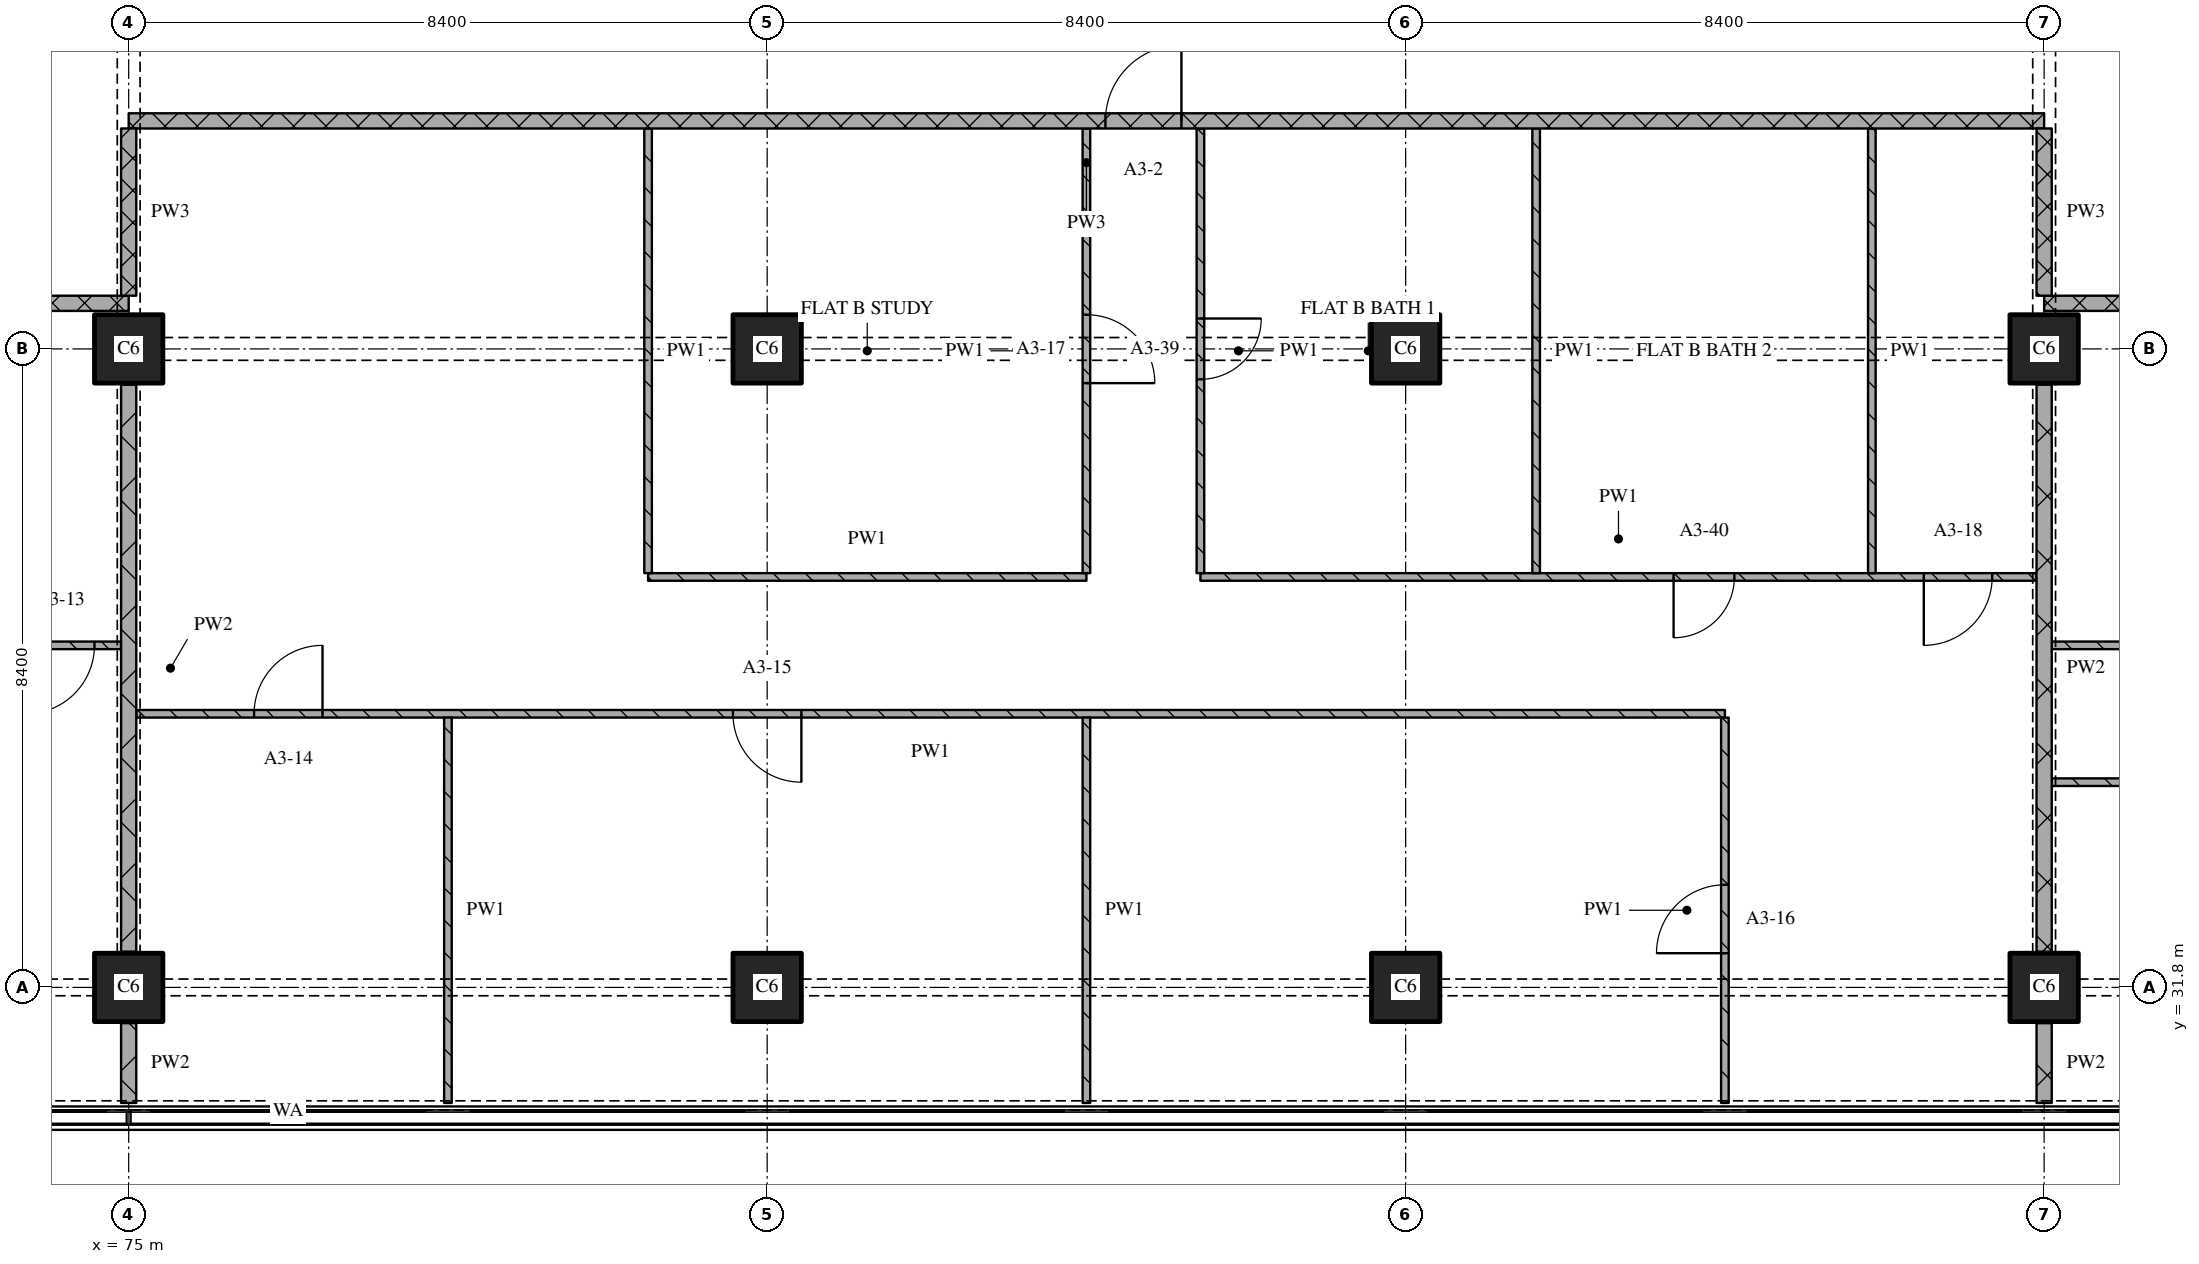
"""IFC4 building model, lengths in metres.
Left out: names, types, materials, properties, quantities, classifications, styles, units other than length and angle.
Written with IfcOpenShell. Run it as: python <this file> out.ifc"""

import sys

from ifc_helpers import new_model, si_unit, direction, frame, frame_2d, origin, origin_2d, place, context, subcontext, project, spatial, rectangle, extrude, element, fill, save


model = new_model("IFC4")
c1 = context("Model", 3, precision=1e-05, world=origin(), true_north=direction((0.0, 1.0)))
c2 = subcontext(c1, "Body", "Model", "MODEL_VIEW")
j1 = project(units=[si_unit("LENGTHUNIT", "METRE"), si_unit("PLANEANGLEUNIT", "RADIAN")], contexts=[c1])
p1 = place(None, origin())
s1 = spatial("IfcSite", under=j1, at=p1, CompositionType="ELEMENT")
p2 = place(p1, origin())
s2 = spatial("IfcBuilding", under=s1, at=p2, CompositionType="ELEMENT")
p3 = place(p2, frame((0.0, 0.0, 62.4)))
s3 = spatial("IfcBuildingStorey", under=s2, at=p3, CompositionType="ELEMENT", Elevation=62.4)
for number, where, z_axis, x_axis in (
    (1, (75.0, 31.8, 0.0), (0.0, 0.0, 1.0), (1.0, 0.0, 0.0)),
    (2, (75.0, 40.2, 0.0), (0.0, 0.0, 1.0), (1.0, 0.0, 0.0)),
    (3, (83.4, 31.8, 0.0), (0.0, 0.0, 1.0), (1.0, 0.0, 0.0)),
    (4, (83.4, 40.2, 0.0), (0.0, 0.0, 1.0), (1.0, 0.0, 0.0)),
    (5, (91.8, 31.8, 0.0), (0.0, 0.0, 1.0), (1.0, 0.0, 0.0)),
    (6, (91.8, 40.2, 0.0), (0.0, 0.0, 1.0), (1.0, 0.0, 0.0)),
    (7, (100.2, 31.8, 0.0), (0.0, 0.0, 1.0), (1.0, 0.0, 0.0)),
    (8, (100.2, 40.2, 0.0), (0.0, 0.0, 1.0), (1.0, 0.0, 0.0)),
):
    element("IfcColumn", number, at=place(p3, frame(where, z_axis=z_axis, x_axis=x_axis)), inside=s3, PredefinedType="COLUMN", context=c2, shape_type="SweptSolid", body=[
        extrude(rectangle(XDim=0.9, YDim=0.9, at=origin_2d()), origin(), (0.0, 0.0, 1.0), 3.6),
    ])
p4 = place(p3, frame((100.3, 34.5, 0.0), z_axis=(0.0, 0.0, 1.0), x_axis=(1.0, 0.0, 0.0)))
e9 = element("IfcWall", 9, at=p4, inside=s3, PredefinedType="PARTITIONING", context=c2, shape_type="SweptSolid", body=[
    extrude(rectangle(XDim=8.3, YDim=0.1, at=frame_2d((4.15, 0.0))), origin(), (0.0, 0.0, 1.0), 3.32),
])
p5 = place(p3, frame((96.0, 35.4, 0.0), z_axis=(0.0, 0.0, 1.0), x_axis=(-1.0, 0.0, 0.0)))
e10 = element("IfcWall", 10, at=p5, inside=s3, PredefinedType="PARTITIONING", context=c2, shape_type="SweptSolid", body=[
    extrude(rectangle(XDim=20.9, YDim=0.1, at=frame_2d((10.45, 0.0))), origin(), (0.0, 0.0, 1.0), 3.32),
])
p6 = place(p5, frame((12.15, 0.0, 0.0)))
e11 = element("IfcOpeningElement", 11, at=p6, cuts=e10, PredefinedType="OPENING", context=c2, shape_type="SweptSolid", body=[
    extrude(rectangle(XDim=0.9, YDim=2.1, at=frame_2d((0.45, 1.05))), frame((0.0, 0.06, 0.0), z_axis=(0.0, -1.0, 0.0), x_axis=(1.0, 0.0, 0.0)), (0.0, 0.0, 1.0), 0.12),
])
p7 = place(p5, frame((18.45, 0.0, 0.0)))
e12 = element("IfcOpeningElement", 12, at=p7, cuts=e10, PredefinedType="OPENING", context=c2, shape_type="SweptSolid", body=[
    extrude(rectangle(XDim=0.9, YDim=2.1, at=frame_2d((0.45, 1.05))), frame((0.0, 0.06, 0.0), z_axis=(0.0, -1.0, 0.0), x_axis=(1.0, 0.0, 0.0)), (0.0, 0.0, 1.0), 0.12),
])
p8 = place(p3, frame((64.2, 36.3, 0.0), z_axis=(0.0, 0.0, 1.0), x_axis=(1.0, 0.0, 0.0)))
e13 = element("IfcWall", 13, at=p8, inside=s3, PredefinedType="PARTITIONING", context=c2, shape_type="SweptSolid", body=[
    extrude(rectangle(XDim=10.7, YDim=0.1, at=frame_2d((5.35, 0.0))), origin(), (0.0, 0.0, 1.0), 3.32),
])
p9 = place(p8, frame((6.35, 0.0, 0.0)))
e14 = element("IfcOpeningElement", 14, at=p9, cuts=e13, PredefinedType="OPENING", context=c2, shape_type="SweptSolid", body=[
    extrude(rectangle(XDim=0.8, YDim=2.1, at=frame_2d((0.4, 1.05))), frame((0.0, 0.06, 0.0), z_axis=(0.0, -1.0, 0.0), x_axis=(1.0, 0.0, 0.0)), (0.0, 0.0, 1.0), 0.12),
])
p10 = place(p8, frame((9.45, 0.0, 0.0)))
e15 = element("IfcOpeningElement", 15, at=p10, cuts=e13, PredefinedType="OPENING", context=c2, shape_type="SweptSolid", body=[
    extrude(rectangle(XDim=0.9, YDim=2.1, at=frame_2d((0.45, 1.05))), frame((0.0, 0.06, 0.0), z_axis=(0.0, -1.0, 0.0), x_axis=(1.0, 0.0, 0.0)), (0.0, 0.0, 1.0), 0.12),
])
p11 = place(p3, frame((100.3, 36.3, 0.0), z_axis=(0.0, 0.0, 1.0), x_axis=(1.0, 0.0, 0.0)))
e16 = element("IfcWall", 16, at=p11, inside=s3, PredefinedType="PARTITIONING", context=c2, shape_type="SweptSolid", body=[
    extrude(rectangle(XDim=10.7, YDim=0.1, at=frame_2d((5.35, 0.0))), origin(), (0.0, 0.0, 1.0), 3.32),
])
p12 = place(p11, frame((1.75, 0.0, 0.0)))
e17 = element("IfcOpeningElement", 17, at=p12, cuts=e16, PredefinedType="OPENING", context=c2, shape_type="SweptSolid", body=[
    extrude(rectangle(XDim=0.8, YDim=2.1, at=frame_2d((0.4, 1.05))), frame((0.0, 0.06, 0.0), z_axis=(0.0, -1.0, 0.0), x_axis=(1.0, 0.0, 0.0)), (0.0, 0.0, 1.0), 0.12),
])
p13 = place(p11, frame((6.25, 0.0, 0.0)))
e18 = element("IfcOpeningElement", 18, at=p13, cuts=e16, PredefinedType="OPENING", context=c2, shape_type="SweptSolid", body=[
    extrude(rectangle(XDim=0.8, YDim=2.1, at=frame_2d((0.4, 1.05))), frame((0.0, 0.06, 0.0), z_axis=(0.0, -1.0, 0.0), x_axis=(1.0, 0.0, 0.0)), (0.0, 0.0, 1.0), 0.12),
])
p14 = place(p3, frame((81.833, 37.2, 0.0), z_axis=(0.0, 0.0, 1.0), x_axis=(1.0, 0.0, 0.0)))
e19 = element("IfcWall", 19, at=p14, inside=s3, PredefinedType="PARTITIONING", context=c2, shape_type="SweptSolid", body=[
    extrude(rectangle(XDim=5.767, YDim=0.1, at=frame_2d((2.883, 0.0))), origin(), (0.0, 0.0, 1.0), 3.32),
])
p15 = place(p3, frame((89.1, 37.2, 0.0), z_axis=(0.0, 0.0, 1.0), x_axis=(1.0, 0.0, 0.0)))
e20 = element("IfcWall", 20, at=p15, inside=s3, PredefinedType="PARTITIONING", context=c2, shape_type="SweptSolid", body=[
    extrude(rectangle(XDim=11.0, YDim=0.1, at=frame_2d((5.5, 0.0))), origin(), (0.0, 0.0, 1.0), 3.32),
])
p16 = place(p15, frame((6.225, 0.0, 0.0)))
e21 = element("IfcOpeningElement", 21, at=p16, cuts=e20, PredefinedType="OPENING", context=c2, shape_type="SweptSolid", body=[
    extrude(rectangle(XDim=0.8, YDim=2.1, at=frame_2d((0.4, 1.05))), frame((0.0, 0.06, 0.0), z_axis=(0.0, -1.0, 0.0), x_axis=(1.0, 0.0, 0.0)), (0.0, 0.0, 1.0), 0.12),
])
p17 = place(p15, frame((9.517, 0.0, 0.0)))
e22 = element("IfcOpeningElement", 22, at=p17, cuts=e20, PredefinedType="OPENING", context=c2, shape_type="SweptSolid", body=[
    extrude(rectangle(XDim=0.9, YDim=2.1, at=frame_2d((0.45, 1.05))), frame((0.0, 0.06, 0.0), z_axis=(0.0, -1.0, 0.0), x_axis=(1.0, 0.0, 0.0)), (0.0, 0.0, 1.0), 0.12),
])
p18 = place(p3, frame((75.0, 40.8, 0.0), z_axis=(0.0, 0.0, 1.0), x_axis=(-1.0, 0.0, 0.0)))
e23 = element("IfcWall", 23, at=p18, inside=s3, PredefinedType="PARTITIONING", context=c2, shape_type="SweptSolid", body=[
    extrude(rectangle(XDim=24.08, YDim=0.2, at=frame_2d((12.04, 0.0))), origin(), (0.0, 0.0, 1.0), 3.32),
])
p19 = place(p18, frame((11.05, 0.0, 0.0)))
e24 = element("IfcOpeningElement", 24, at=p19, cuts=e23, PredefinedType="OPENING", context=c2, shape_type="SweptSolid", body=[
    extrude(rectangle(XDim=1.0, YDim=2.1, at=frame_2d((0.5, 1.05))), frame((0.0, 0.11, 0.0), z_axis=(0.0, -1.0, 0.0), x_axis=(1.0, 0.0, 0.0)), (0.0, 0.0, 1.0), 0.22),
])
p20 = place(p3, frame((124.28, 40.8, 0.0), z_axis=(0.0, 0.0, 1.0), x_axis=(-1.0, 0.0, 0.0)))
e25 = element("IfcWall", 25, at=p20, inside=s3, PredefinedType="PARTITIONING", context=c2, shape_type="SweptSolid", body=[
    extrude(rectangle(XDim=24.08, YDim=0.2, at=frame_2d((12.04, 0.0))), origin(), (0.0, 0.0, 1.0), 3.32),
])
p21 = place(p20, frame((12.03, 0.0, 0.0)))
e26 = element("IfcOpeningElement", 26, at=p21, cuts=e25, PredefinedType="OPENING", context=c2, shape_type="SweptSolid", body=[
    extrude(rectangle(XDim=1.0, YDim=2.1, at=frame_2d((0.5, 1.05))), frame((0.0, 0.11, 0.0), z_axis=(0.0, -1.0, 0.0), x_axis=(1.0, 0.0, 0.0)), (0.0, 0.0, 1.0), 0.22),
])
p22 = place(p3, frame((100.2, 43.2, 0.0), z_axis=(0.0, 0.0, 1.0), x_axis=(-1.0, 0.0, 0.0)))
e27 = element("IfcWall", 27, at=p22, inside=s3, PredefinedType="PARTITIONING", context=c2, shape_type="SweptSolid", body=[
    extrude(rectangle(XDim=25.2, YDim=0.2, at=frame_2d((12.6, 0.0))), origin(), (0.0, 0.0, 1.0), 3.32),
])
p23 = place(p22, frame((11.35, 0.0, 0.0)))
e28 = element("IfcOpeningElement", 28, at=p23, cuts=e27, PredefinedType="OPENING", context=c2, shape_type="SweptSolid", body=[
    extrude(rectangle(XDim=1.0, YDim=2.1, at=frame_2d((0.5, 1.05))), frame((0.0, 0.11, 0.0), z_axis=(0.0, -1.0, 0.0), x_axis=(1.0, 0.0, 0.0)), (0.0, 0.0, 1.0), 0.22),
])
p24 = place(p3, frame((75.0, 43.1, 0.0), z_axis=(0.0, 0.0, 1.0), x_axis=(0.0, -1.0, 0.0)))
e29 = element("IfcWall", 29, at=p24, inside=s3, PredefinedType="PARTITIONING", context=c2, shape_type="SweptSolid", body=[
    extrude(rectangle(XDim=2.2, YDim=0.2, at=frame_2d((1.1, 0.0))), origin(), (0.0, 0.0, 1.0), 2.43),
])
p25 = place(p3, frame((75.0, 31.33, 0.0), z_axis=(0.0, 0.0, 1.0), x_axis=(0.0, -1.0, 0.0)))
e30 = element("IfcWall", 30, at=p25, inside=s3, PredefinedType="PARTITIONING", context=c2, shape_type="SweptSolid", body=[
    extrude(rectangle(XDim=1.05, YDim=0.2, at=frame_2d((0.525, 0.0))), origin(), (0.0, 0.0, 1.0), 3.32),
])
p26 = place(p3, frame((75.0, 39.73, 0.0), z_axis=(0.0, 0.0, 1.0), x_axis=(0.0, -1.0, 0.0)))
e31 = element("IfcWall", 31, at=p26, inside=s3, PredefinedType="PARTITIONING", context=c2, shape_type="SweptSolid", body=[
    extrude(rectangle(XDim=7.46, YDim=0.2, at=frame_2d((3.73, 0.0))), origin(), (0.0, 0.0, 1.0), 2.83),
])
p27 = place(p3, frame((79.2, 35.35, 0.0), z_axis=(0.0, 0.0, 1.0), x_axis=(0.0, -1.0, 0.0)))
e32 = element("IfcWall", 32, at=p27, inside=s3, PredefinedType="PARTITIONING", context=c2, shape_type="SweptSolid", body=[
    extrude(rectangle(XDim=5.07, YDim=0.1, at=frame_2d((2.535, 0.0))), origin(), (0.0, 0.0, 1.0), 3.32),
])
p28 = place(p3, frame((81.833, 43.1, 0.0), z_axis=(0.0, 0.0, 1.0), x_axis=(0.0, -1.0, 0.0)))
e33 = element("IfcWall", 33, at=p28, inside=s3, PredefinedType="PARTITIONING", context=c2, shape_type="SweptSolid", body=[
    extrude(rectangle(XDim=5.85, YDim=0.1, at=frame_2d((2.925, 0.0))), origin(), (0.0, 0.0, 1.0), 3.32),
])
p29 = place(p3, frame((87.6, 35.35, 0.0), z_axis=(0.0, 0.0, 1.0), x_axis=(0.0, -1.0, 0.0)))
e34 = element("IfcWall", 34, at=p29, inside=s3, PredefinedType="PARTITIONING", context=c2, shape_type="SweptSolid", body=[
    extrude(rectangle(XDim=5.07, YDim=0.1, at=frame_2d((2.535, 0.0))), origin(), (0.0, 0.0, 1.0), 3.32),
])
p30 = place(p3, frame((87.6, 37.25, 0.0), z_axis=(0.0, 0.0, 1.0), x_axis=(0.0, 1.0, 0.0)))
e35 = element("IfcWall", 35, at=p30, inside=s3, PredefinedType="PARTITIONING", context=c2, shape_type="SweptSolid", body=[
    extrude(rectangle(XDim=5.85, YDim=0.1, at=frame_2d((2.925, 0.0))), origin(), (0.0, 0.0, 1.0), 3.32),
])
p31 = place(p30, frame((2.5, 0.0, 0.0)))
e36 = element("IfcOpeningElement", 36, at=p31, cuts=e35, PredefinedType="OPENING", context=c2, shape_type="SweptSolid", body=[
    extrude(rectangle(XDim=0.9, YDim=2.1, at=frame_2d((0.45, 1.05))), frame((0.0, 0.06, 0.0), z_axis=(0.0, -1.0, 0.0), x_axis=(1.0, 0.0, 0.0)), (0.0, 0.0, 1.0), 0.12),
])
p32 = place(p3, frame((89.1, 43.1, 0.0), z_axis=(0.0, 0.0, 1.0), x_axis=(0.0, -1.0, 0.0)))
e37 = element("IfcWall", 37, at=p32, inside=s3, PredefinedType="PARTITIONING", context=c2, shape_type="SweptSolid", body=[
    extrude(rectangle(XDim=5.85, YDim=0.1, at=frame_2d((2.925, 0.0))), origin(), (0.0, 0.0, 1.0), 3.32),
])
p33 = place(p32, frame((2.5, 0.0, 0.0)))
e38 = element("IfcOpeningElement", 38, at=p33, cuts=e37, PredefinedType="OPENING", context=c2, shape_type="SweptSolid", body=[
    extrude(rectangle(XDim=0.8, YDim=2.1, at=frame_2d((0.4, 1.05))), frame((0.0, 0.06, 0.0), z_axis=(0.0, -1.0, 0.0), x_axis=(1.0, 0.0, 0.0)), (0.0, 0.0, 1.0), 0.12),
])
p34 = place(p3, frame((93.517, 43.1, 0.0), z_axis=(0.0, 0.0, 1.0), x_axis=(0.0, -1.0, 0.0)))
e39 = element("IfcWall", 39, at=p34, inside=s3, PredefinedType="PARTITIONING", context=c2, shape_type="SweptSolid", body=[
    extrude(rectangle(XDim=5.85, YDim=0.1, at=frame_2d((2.925, 0.0))), origin(), (0.0, 0.0, 1.0), 3.32),
])
p35 = place(p3, frame((96.0, 30.28, 0.0), z_axis=(0.0, 0.0, 1.0), x_axis=(0.0, 1.0, 0.0)))
e40 = element("IfcWall", 40, at=p35, inside=s3, PredefinedType="PARTITIONING", context=c2, shape_type="SweptSolid", body=[
    extrude(rectangle(XDim=5.07, YDim=0.1, at=frame_2d((2.535, 0.0))), origin(), (0.0, 0.0, 1.0), 3.32),
])
p36 = place(p35, frame((1.97, 0.0, 0.0)))
e41 = element("IfcOpeningElement", 41, at=p36, cuts=e40, PredefinedType="OPENING", context=c2, shape_type="SweptSolid", body=[
    extrude(rectangle(XDim=0.9, YDim=2.1, at=frame_2d((0.45, 1.05))), frame((0.0, 0.06, 0.0), z_axis=(0.0, -1.0, 0.0), x_axis=(1.0, 0.0, 0.0)), (0.0, 0.0, 1.0), 0.12),
])
p37 = place(p3, frame((97.933, 43.1, 0.0), z_axis=(0.0, 0.0, 1.0), x_axis=(0.0, -1.0, 0.0)))
e42 = element("IfcWall", 42, at=p37, inside=s3, PredefinedType="PARTITIONING", context=c2, shape_type="SweptSolid", body=[
    extrude(rectangle(XDim=5.85, YDim=0.1, at=frame_2d((2.925, 0.0))), origin(), (0.0, 0.0, 1.0), 3.32),
])
p38 = place(p3, frame((100.2, 43.1, 0.0), z_axis=(0.0, 0.0, 1.0), x_axis=(0.0, -1.0, 0.0)))
e43 = element("IfcWall", 43, at=p38, inside=s3, PredefinedType="PARTITIONING", context=c2, shape_type="SweptSolid", body=[
    extrude(rectangle(XDim=2.2, YDim=0.2, at=frame_2d((1.1, 0.0))), origin(), (0.0, 0.0, 1.0), 2.43),
])
p39 = place(p3, frame((100.2, 31.33, 0.0), z_axis=(0.0, 0.0, 1.0), x_axis=(0.0, -1.0, 0.0)))
e44 = element("IfcWall", 44, at=p39, inside=s3, PredefinedType="PARTITIONING", context=c2, shape_type="SweptSolid", body=[
    extrude(rectangle(XDim=1.05, YDim=0.2, at=frame_2d((0.525, 0.0))), origin(), (0.0, 0.0, 1.0), 3.32),
])
p40 = place(p3, frame((100.2, 39.73, 0.0), z_axis=(0.0, 0.0, 1.0), x_axis=(0.0, -1.0, 0.0)))
e45 = element("IfcWall", 45, at=p40, inside=s3, PredefinedType="PARTITIONING", context=c2, shape_type="SweptSolid", body=[
    extrude(rectangle(XDim=7.46, YDim=0.2, at=frame_2d((3.73, 0.0))), origin(), (0.0, 0.0, 1.0), 2.83),
])
p41 = place(p6, origin())
e46 = element("IfcDoor", 46, at=p41, inside=s3, OperationType="SINGLE_SWING_LEFT", PredefinedType="DOOR", context=c2, shape_type="SweptSolid", body=[
    extrude(rectangle(XDim=0.9, YDim=2.1, at=frame_2d((0.45, 1.05))), frame((0.0, 0.025, 0.0), z_axis=(0.0, -1.0, 0.0), x_axis=(1.0, 0.0, 0.0)), (0.0, 0.0, 1.0), 0.05),
])
fill(e11, e46)
p42 = place(p7, origin())
e47 = element("IfcDoor", 47, at=p42, inside=s3, OperationType="SINGLE_SWING_RIGHT", PredefinedType="DOOR", context=c2, shape_type="SweptSolid", body=[
    extrude(rectangle(XDim=0.9, YDim=2.1, at=frame_2d((0.45, 1.05))), frame((0.0, 0.025, 0.0), z_axis=(0.0, -1.0, 0.0), x_axis=(1.0, 0.0, 0.0)), (0.0, 0.0, 1.0), 0.05),
])
fill(e12, e47)
p43 = place(p10, origin())
e48 = element("IfcDoor", 48, at=p43, inside=s3, OperationType="SINGLE_SWING_RIGHT", PredefinedType="DOOR", context=c2, shape_type="SweptSolid", body=[
    extrude(rectangle(XDim=0.9, YDim=2.1, at=frame_2d((0.45, 1.05))), frame((0.0, 0.025, 0.0), z_axis=(0.0, -1.0, 0.0), x_axis=(1.0, 0.0, 0.0)), (0.0, 0.0, 1.0), 0.05),
])
fill(e15, e48)
p44 = place(p16, origin())
e49 = element("IfcDoor", 49, at=p44, inside=s3, OperationType="SINGLE_SWING_RIGHT", PredefinedType="DOOR", context=c2, shape_type="SweptSolid", body=[
    extrude(rectangle(XDim=0.8, YDim=2.1, at=frame_2d((0.4, 1.05))), frame((0.0, 0.025, 0.0), z_axis=(0.0, -1.0, 0.0), x_axis=(1.0, 0.0, 0.0)), (0.0, 0.0, 1.0), 0.05),
])
fill(e21, e49)
p45 = place(p17, origin())
e50 = element("IfcDoor", 50, at=p45, inside=s3, OperationType="SINGLE_SWING_RIGHT", PredefinedType="DOOR", context=c2, shape_type="SweptSolid", body=[
    extrude(rectangle(XDim=0.9, YDim=2.1, at=frame_2d((0.45, 1.05))), frame((0.0, 0.025, 0.0), z_axis=(0.0, -1.0, 0.0), x_axis=(1.0, 0.0, 0.0)), (0.0, 0.0, 1.0), 0.05),
])
fill(e22, e50)
p46 = place(p23, origin())
e51 = element("IfcDoor", 51, at=p46, inside=s3, OperationType="SINGLE_SWING_RIGHT", PredefinedType="DOOR", context=c2, shape_type="SweptSolid", body=[
    extrude(rectangle(XDim=1.0, YDim=2.1, at=frame_2d((0.5, 1.05))), frame((0.0, 0.025, 0.0), z_axis=(0.0, -1.0, 0.0), x_axis=(1.0, 0.0, 0.0)), (0.0, 0.0, 1.0), 0.05),
])
fill(e28, e51)
p47 = place(p31, origin())
e52 = element("IfcDoor", 52, at=p47, inside=s3, OperationType="SINGLE_SWING_RIGHT", PredefinedType="DOOR", context=c2, shape_type="SweptSolid", body=[
    extrude(rectangle(XDim=0.9, YDim=2.1, at=frame_2d((0.45, 1.05))), frame((0.0, 0.025, 0.0), z_axis=(0.0, -1.0, 0.0), x_axis=(1.0, 0.0, 0.0)), (0.0, 0.0, 1.0), 0.05),
])
fill(e36, e52)
p48 = place(p33, origin())
e53 = element("IfcDoor", 53, at=p48, inside=s3, OperationType="SINGLE_SWING_LEFT", PredefinedType="DOOR", context=c2, shape_type="SweptSolid", body=[
    extrude(rectangle(XDim=0.8, YDim=2.1, at=frame_2d((0.4, 1.05))), frame((0.0, 0.025, 0.0), z_axis=(0.0, -1.0, 0.0), x_axis=(1.0, 0.0, 0.0)), (0.0, 0.0, 1.0), 0.05),
])
fill(e38, e53)
p49 = place(p36, origin())
e54 = element("IfcDoor", 54, at=p49, inside=s3, OperationType="SINGLE_SWING_LEFT", PredefinedType="DOOR", context=c2, shape_type="SweptSolid", body=[
    extrude(rectangle(XDim=0.9, YDim=2.1, at=frame_2d((0.45, 1.05))), frame((0.0, 0.025, 0.0), z_axis=(0.0, -1.0, 0.0), x_axis=(1.0, 0.0, 0.0)), (0.0, 0.0, 1.0), 0.05),
])
fill(e41, e54)
save(model, sys.argv[1])
